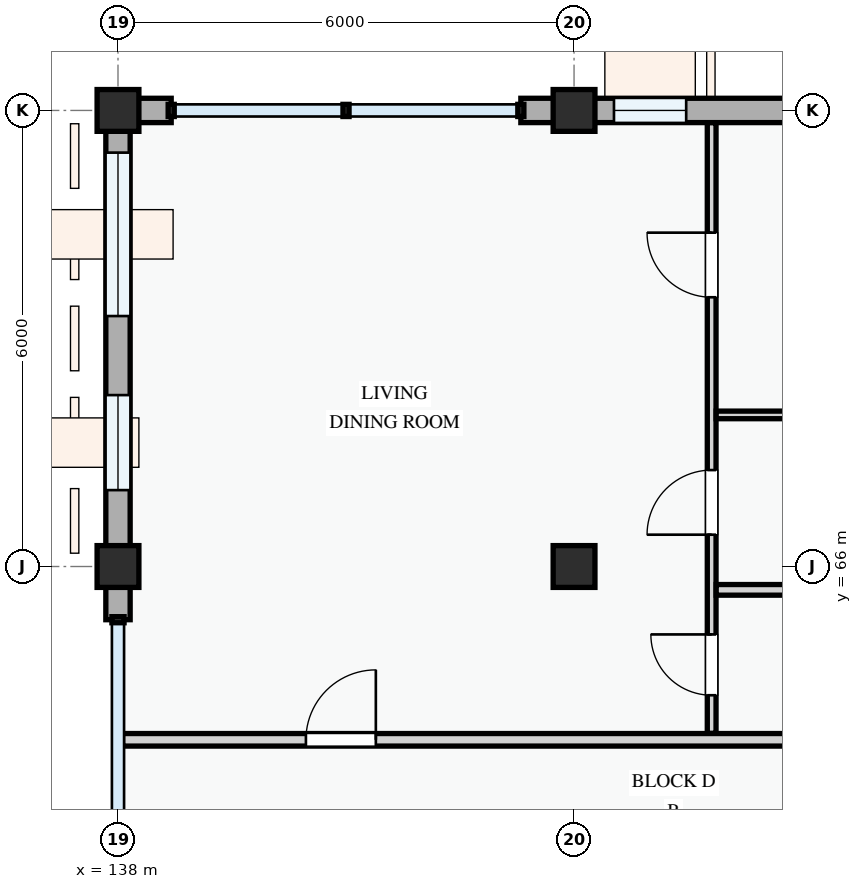
"""IFC4 building model, lengths in metres.
Left out: names, types, materials, properties, quantities, classifications, styles, units other than length and angle.
Written with IfcOpenShell. Run it as: python <this file> out.ifc"""

import sys

from ifc_helpers import new_model, si_unit, direction, frame, frame_2d, origin, origin_2d, place, context, subcontext, project, spatial, rectangle, extrude, element, fill, save


model = new_model("IFC4")
c1 = context("Model", 3, precision=1e-05, world=origin(), true_north=direction((0.0, 1.0)))
c2 = subcontext(c1, "Body", "Model", "MODEL_VIEW")
j1 = project(units=[si_unit("LENGTHUNIT", "METRE"), si_unit("PLANEANGLEUNIT", "RADIAN")], contexts=[c1])
p1 = place(None, origin())
s1 = spatial("IfcSite", under=j1, at=p1, CompositionType="ELEMENT")
p2 = place(p1, origin())
s2 = spatial("IfcBuilding", under=s1, at=p2, CompositionType="ELEMENT")
p3 = place(p2, frame((0.0, 0.0, 11.4)))
s3 = spatial("IfcBuildingStorey", under=s2, at=p3, CompositionType="ELEMENT", Elevation=11.4)
for number, where, z_axis, x_axis in (
    (1, (138.0, 66.0, 0.0), (0.0, 0.0, 1.0), (1.0, 0.0, 0.0)),
    (2, (138.0, 72.0, 0.0), (0.0, 0.0, 1.0), (1.0, 0.0, 0.0)),
    (3, (144.0, 66.0, 0.0), (0.0, 0.0, 1.0), (1.0, 0.0, 0.0)),
    (4, (144.0, 72.0, 0.0), (0.0, 0.0, 1.0), (1.0, 0.0, 0.0)),
):
    element("IfcColumn", number, at=place(p3, frame(where, z_axis=z_axis, x_axis=x_axis)), inside=s3, PredefinedType="COLUMN", context=c2, shape_type="SweptSolid", body=[
        extrude(rectangle(XDim=0.55, YDim=0.55, at=origin_2d()), origin(), (0.0, 0.0, 1.0), 3.3),
    ])
p4 = place(p3, frame((152.4, 72.0, 0.0), z_axis=(0.0, 0.0, 1.0), x_axis=(-1.0, 0.0, 0.0)))
e5 = element("IfcWall", 5, at=p4, inside=s3, PredefinedType="STANDARD", context=c2, shape_type="SweptSolid", body=[
    extrude(rectangle(XDim=8.4, YDim=0.32, at=frame_2d((4.2, 0.0))), origin(), (0.0, 0.0, 1.0), 2.375),
])
p5 = place(p4, frame((0.735, 0.0, 0.78)))
e6 = element("IfcOpeningElement", 6, at=p5, cuts=e5, PredefinedType="OPENING", context=c2, shape_type="SweptSolid", body=[
    extrude(rectangle(XDim=2.18, YDim=1.48, at=frame_2d((1.09, 0.74))), frame((0.0, 0.17, 0.0), z_axis=(0.0, -1.0, 0.0), x_axis=(1.0, 0.0, 0.0)), (0.0, 0.0, 1.0), 0.34),
])
p6 = place(p4, frame((4.405, 0.0, 0.78)))
e7 = element("IfcOpeningElement", 7, at=p6, cuts=e5, PredefinedType="OPENING", context=c2, shape_type="SweptSolid", body=[
    extrude(rectangle(XDim=1.1, YDim=1.3, at=frame_2d((0.55, 0.65))), frame((0.0, 0.17, 0.0), z_axis=(0.0, -1.0, 0.0), x_axis=(1.0, 0.0, 0.0)), (0.0, 0.0, 1.0), 0.34),
])
p7 = place(p4, frame((6.925, 0.0, 0.78)))
e8 = element("IfcOpeningElement", 8, at=p7, cuts=e5, PredefinedType="OPENING", context=c2, shape_type="SweptSolid", body=[
    extrude(rectangle(XDim=0.95, YDim=1.15, at=frame_2d((0.475, 0.575))), frame((0.0, 0.17, 0.0), z_axis=(0.0, -1.0, 0.0), x_axis=(1.0, 0.0, 0.0)), (0.0, 0.0, 1.0), 0.34),
])
p8 = place(p3, frame((144.0, 72.0, 0.0), z_axis=(0.0, 0.0, 1.0), x_axis=(-1.0, 0.0, 0.0)))
e9 = element("IfcWall", 9, at=p8, inside=s3, PredefinedType="STANDARD", context=c2, shape_type="SweptSolid", body=[
    extrude(rectangle(XDim=0.7, YDim=0.32, at=frame_2d((0.35, 0.0))), origin(), (0.0, 0.0, 1.0), 2.475),
])
p9 = place(p3, frame((138.7, 72.0, 0.0), z_axis=(0.0, 0.0, 1.0), x_axis=(-1.0, 0.0, 0.0)))
e10 = element("IfcWall", 10, at=p9, inside=s3, PredefinedType="STANDARD", context=c2, shape_type="SweptSolid", body=[
    extrude(rectangle(XDim=0.538, YDim=0.32, at=frame_2d((0.269, 0.0))), origin(), (0.0, 0.0, 1.0), 2.475),
])
p10 = place(p3, frame((138.0, 72.0, 0.0), z_axis=(0.0, 0.0, 1.0), x_axis=(0.0, -1.0, 0.0)))
e11 = element("IfcWall", 11, at=p10, inside=s3, PredefinedType="STANDARD", context=c2, shape_type="SweptSolid", body=[
    extrude(rectangle(XDim=6.0, YDim=0.32, at=frame_2d((3.0, 0.0))), origin(), (0.0, 0.0, 1.0), 2.575),
])
p11 = place(p10, frame((0.555, 0.0, 0.78)))
e12 = element("IfcOpeningElement", 12, at=p11, cuts=e11, PredefinedType="OPENING", context=c2, shape_type="SweptSolid", body=[
    extrude(rectangle(XDim=2.15, YDim=1.65, at=frame_2d((1.075, 0.825))), frame((0.0, 0.17, 0.0), z_axis=(0.0, -1.0, 0.0), x_axis=(1.0, 0.0, 0.0)), (0.0, 0.0, 1.0), 0.34),
])
p12 = place(p10, frame((3.745, 0.0, 0.78)))
e13 = element("IfcOpeningElement", 13, at=p12, cuts=e11, PredefinedType="OPENING", context=c2, shape_type="SweptSolid", body=[
    extrude(rectangle(XDim=1.25, YDim=1.45, at=frame_2d((0.625, 0.725))), frame((0.0, 0.17, 0.0), z_axis=(0.0, -1.0, 0.0), x_axis=(1.0, 0.0, 0.0)), (0.0, 0.0, 1.0), 0.34),
])
p13 = place(p3, frame((138.0, 66.0, 0.0), z_axis=(0.0, 0.0, 1.0), x_axis=(0.0, -1.0, 0.0)))
e14 = element("IfcWall", 14, at=p13, inside=s3, PredefinedType="STANDARD", context=c2, shape_type="SweptSolid", body=[
    extrude(rectangle(XDim=0.7, YDim=0.32, at=frame_2d((0.35, 0.0))), origin(), (0.0, 0.0, 1.0), 2.425),
])
p14 = place(p3, frame((145.81, 63.804, 0.0), z_axis=(0.0, 0.0, 1.0), x_axis=(0.0, 1.0, 0.0)))
e15 = element("IfcWall", 15, at=p14, inside=s3, PredefinedType="PARTITIONING", context=c2, shape_type="SweptSolid", body=[
    extrude(rectangle(XDim=8.033, YDim=0.115, at=frame_2d((4.017, 0.0))), origin(), (0.0, 0.0, 1.0), 3.0),
])
p15 = place(p14, frame((0.502, 0.0, 0.0)))
e16 = element("IfcOpeningElement", 16, at=p15, cuts=e15, PredefinedType="OPENING", context=c2, shape_type="SweptSolid", body=[
    extrude(rectangle(XDim=0.8, YDim=2.1, at=frame_2d((0.4, 1.05))), frame((0.0, 0.067, 0.0), z_axis=(0.0, -1.0, 0.0), x_axis=(1.0, 0.0, 0.0)), (0.0, 0.0, 1.0), 0.135),
])
p16 = place(p14, frame((2.614, 0.0, 0.0)))
e17 = element("IfcOpeningElement", 17, at=p16, cuts=e15, PredefinedType="OPENING", context=c2, shape_type="SweptSolid", body=[
    extrude(rectangle(XDim=0.85, YDim=2.1, at=frame_2d((0.425, 1.05))), frame((0.0, 0.067, 0.0), z_axis=(0.0, -1.0, 0.0), x_axis=(1.0, 0.0, 0.0)), (0.0, 0.0, 1.0), 0.135),
])
p17 = place(p14, frame((5.738, 0.0, 0.0)))
e18 = element("IfcOpeningElement", 18, at=p17, cuts=e15, PredefinedType="OPENING", context=c2, shape_type="SweptSolid", body=[
    extrude(rectangle(XDim=0.85, YDim=2.1, at=frame_2d((0.425, 1.05))), frame((0.0, 0.067, 0.0), z_axis=(0.0, -1.0, 0.0), x_axis=(1.0, 0.0, 0.0)), (0.0, 0.0, 1.0), 0.135),
])
p18 = place(p3, frame((145.87, 67.994, 0.0), z_axis=(0.0, 0.0, 1.0), x_axis=(1.0, 0.0, 0.0)))
e19 = element("IfcWall", 19, at=p18, inside=s3, PredefinedType="PARTITIONING", context=c2, shape_type="SweptSolid", body=[
    extrude(rectangle(XDim=6.576, YDim=0.1, at=frame_2d((3.288, 0.0))), origin(), (0.0, 0.0, 1.0), 3.0),
])
p19 = place(p3, frame((145.87, 65.693, 0.0), z_axis=(0.0, 0.0, 1.0), x_axis=(1.0, 0.0, 0.0)))
e20 = element("IfcWall", 20, at=p19, inside=s3, PredefinedType="PARTITIONING", context=c2, shape_type="SweptSolid", body=[
    extrude(rectangle(XDim=6.576, YDim=0.14, at=frame_2d((3.288, 0.0))), origin(), (0.0, 0.0, 1.0), 2.375),
])
p20 = place(p3, frame((138.06, 63.72, 0.0), z_axis=(0.0, 0.0, 1.0), x_axis=(1.0, 0.0, 0.0)))
e21 = element("IfcWall", 21, at=p20, inside=s3, PredefinedType="PARTITIONING", context=c2, shape_type="SweptSolid", body=[
    extrude(rectangle(XDim=14.48, YDim=0.165, at=frame_2d((7.24, 0.0))), origin(), (0.0, 0.0, 1.0), 3.0),
])
p21 = place(p20, frame((2.412, 0.0, 0.0)))
e22 = element("IfcOpeningElement", 22, at=p21, cuts=e21, PredefinedType="OPENING", context=c2, shape_type="SweptSolid", body=[
    extrude(rectangle(XDim=0.92, YDim=2.1, at=frame_2d((0.46, 1.05))), frame((0.0, 0.093, 0.0), z_axis=(0.0, -1.0, 0.0), x_axis=(1.0, 0.0, 0.0)), (0.0, 0.0, 1.0), 0.185),
])
p22 = place(p7, origin())
e23 = element("IfcWindow", 23, at=p22, inside=s3, PartitioningType="SINGLE_PANEL", PredefinedType="WINDOW", context=c2, shape_type="SweptSolid", body=[
    extrude(rectangle(XDim=0.95, YDim=1.15, at=frame_2d((0.475, 0.575))), frame((0.0, 0.03, 0.0), z_axis=(0.0, -1.0, 0.0), x_axis=(1.0, 0.0, 0.0)), (0.0, 0.0, 1.0), 0.06),
])
fill(e8, e23)
p23 = place(p11, origin())
e24 = element("IfcWindow", 24, at=p23, inside=s3, PartitioningType="DOUBLE_PANEL_VERTICAL", PredefinedType="WINDOW", context=c2, shape_type="SweptSolid", body=[
    extrude(rectangle(XDim=2.15, YDim=1.65, at=frame_2d((1.075, 0.825))), frame((0.0, 0.03, 0.0), z_axis=(0.0, -1.0, 0.0), x_axis=(1.0, 0.0, 0.0)), (0.0, 0.0, 1.0), 0.06),
])
fill(e12, e24)
p24 = place(p12, origin())
e25 = element("IfcWindow", 25, at=p24, inside=s3, PartitioningType="SINGLE_PANEL", PredefinedType="WINDOW", context=c2, shape_type="SweptSolid", body=[
    extrude(rectangle(XDim=1.25, YDim=1.45, at=frame_2d((0.625, 0.725))), frame((0.0, 0.03, 0.0), z_axis=(0.0, -1.0, 0.0), x_axis=(1.0, 0.0, 0.0)), (0.0, 0.0, 1.0), 0.06),
])
fill(e13, e25)
p25 = place(p15, origin())
e26 = element("IfcDoor", 26, at=p25, inside=s3, OperationType="SINGLE_SWING_RIGHT", PredefinedType="DOOR", context=c2, shape_type="SweptSolid", body=[
    extrude(rectangle(XDim=0.8, YDim=2.1, at=frame_2d((0.4, 1.05))), frame((0.0, 0.025, 0.0), z_axis=(0.0, -1.0, 0.0), x_axis=(1.0, 0.0, 0.0)), (0.0, 0.0, 1.0), 0.05),
])
fill(e16, e26)
p26 = place(p16, origin())
e27 = element("IfcDoor", 27, at=p26, inside=s3, OperationType="SINGLE_SWING_LEFT", PredefinedType="DOOR", context=c2, shape_type="SweptSolid", body=[
    extrude(rectangle(XDim=0.85, YDim=2.1, at=frame_2d((0.425, 1.05))), frame((0.0, 0.025, 0.0), z_axis=(0.0, -1.0, 0.0), x_axis=(1.0, 0.0, 0.0)), (0.0, 0.0, 1.0), 0.05),
])
fill(e17, e27)
p27 = place(p17, origin())
e28 = element("IfcDoor", 28, at=p27, inside=s3, OperationType="SINGLE_SWING_RIGHT", PredefinedType="DOOR", context=c2, shape_type="SweptSolid", body=[
    extrude(rectangle(XDim=0.85, YDim=2.1, at=frame_2d((0.425, 1.05))), frame((0.0, 0.025, 0.0), z_axis=(0.0, -1.0, 0.0), x_axis=(1.0, 0.0, 0.0)), (0.0, 0.0, 1.0), 0.05),
])
fill(e18, e28)
p28 = place(p21, origin())
e29 = element("IfcDoor", 29, at=p28, inside=s3, OperationType="SINGLE_SWING_RIGHT", PredefinedType="DOOR", context=c2, shape_type="SweptSolid", body=[
    extrude(rectangle(XDim=0.92, YDim=2.1, at=frame_2d((0.46, 1.05))), frame((0.0, 0.025, 0.0), z_axis=(0.0, -1.0, 0.0), x_axis=(1.0, 0.0, 0.0)), (0.0, 0.0, 1.0), 0.05),
])
fill(e22, e29)
save(model, sys.argv[1])
